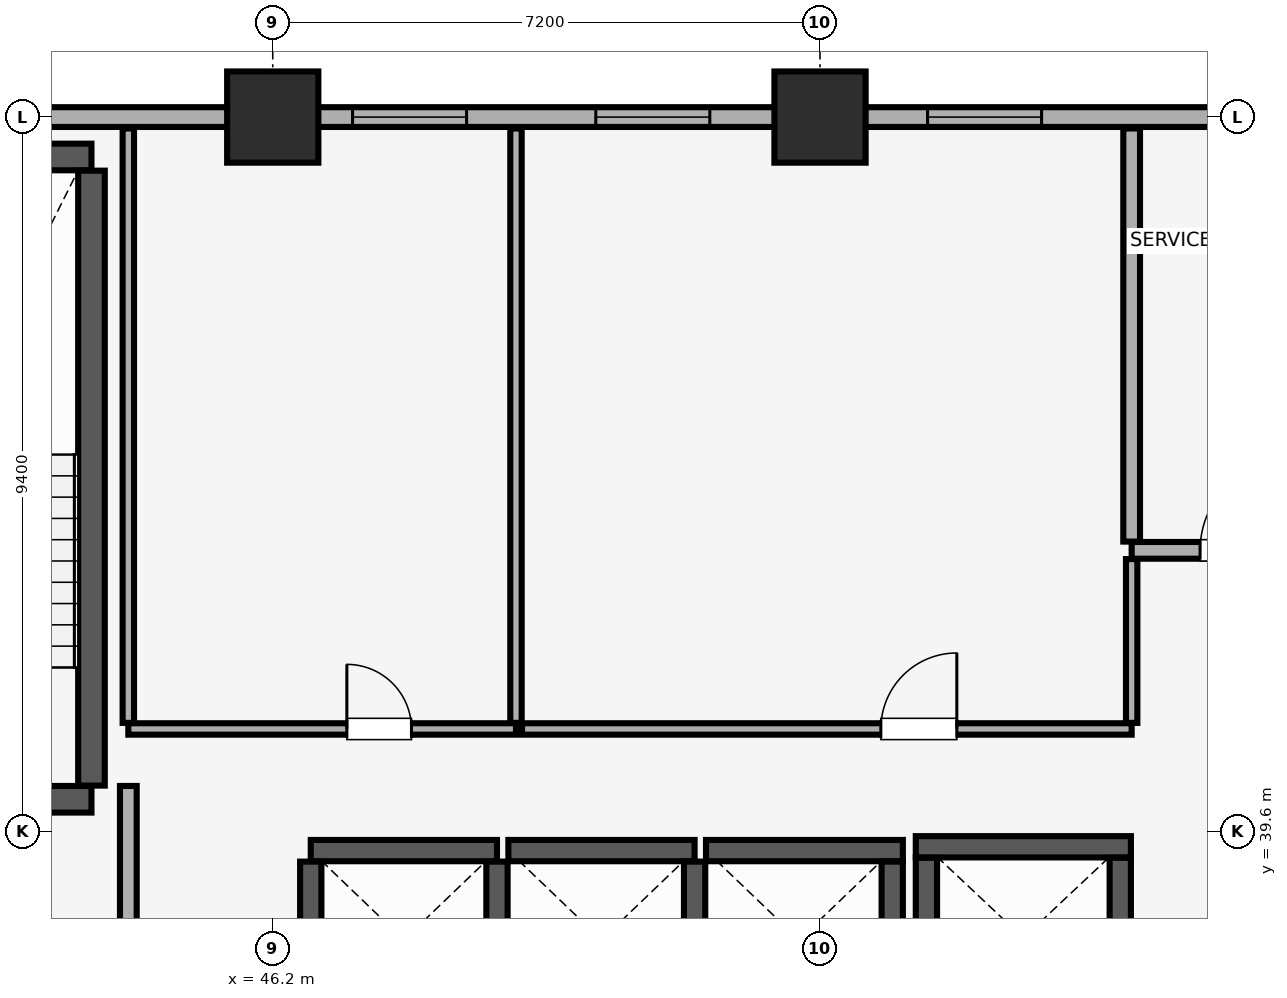
"""IFC4 building model, lengths in metres.
Left out: names, types, materials, properties, quantities, classifications, styles, units other than length and angle.
Written with IfcOpenShell. Run it as: python <this file> out.ifc"""

import sys

from ifc_helpers import new_model, si_unit, direction, frame, frame_2d, origin, origin_2d, place, context, subcontext, project, spatial, rectangle, extrude, element, fill, save


model = new_model("IFC4")
c1 = context("Model", 3, precision=1e-05, world=origin(), true_north=direction((0.0, 1.0)))
c2 = subcontext(c1, "Body", "Model", "MODEL_VIEW")
j1 = project(units=[si_unit("LENGTHUNIT", "METRE"), si_unit("PLANEANGLEUNIT", "RADIAN")], contexts=[c1])
p1 = place(None, origin())
s1 = spatial("IfcSite", under=j1, at=p1, CompositionType="ELEMENT")
p2 = place(p1, origin())
s2 = spatial("IfcBuilding", under=s1, at=p2, CompositionType="ELEMENT")
p3 = place(p2, frame((0.0, 0.0, 126.8)))
s3 = spatial("IfcBuildingStorey", under=s2, at=p3, CompositionType="ELEMENT", Elevation=126.8)
for number, where, z_axis, x_axis in (
    (1, (46.2, 49.0, 0.0), (0.0, 0.0, 1.0), (1.0, 0.0, 0.0)),
    (2, (53.4, 49.0, 0.0), (0.0, 0.0, 1.0), (1.0, 0.0, 0.0)),
):
    element("IfcColumn", number, at=place(p3, frame(where, z_axis=z_axis, x_axis=x_axis)), inside=s3, PredefinedType="COLUMN", context=c2, shape_type="SweptSolid", body=[
        extrude(rectangle(XDim=1.2, YDim=1.2, at=origin_2d()), origin(), (0.0, 0.0, 1.0), 3.51),
    ])
p4 = place(p3, frame((79.8, 49.0, 0.0), z_axis=(0.0, 0.0, 1.0), x_axis=(-1.0, 0.0, 0.0)))
e3 = element("IfcWall", 3, at=p4, inside=s3, PredefinedType="SOLIDWALL", context=c2, shape_type="SweptSolid", body=[
    extrude(rectangle(XDim=75.6, YDim=0.26, at=frame_2d((37.8, 0.0))), origin(), (0.0, 0.0, 1.0), 2.56),
])
p5 = place(p4, frame((72.565, 0.0, 0.85)))
e4 = element("IfcOpeningElement", 4, at=p5, cuts=e3, PredefinedType="OPENING", context=c2, shape_type="SweptSolid", body=[
    extrude(rectangle(XDim=1.5, YDim=1.4, at=frame_2d((0.75, 0.7))), frame((0.0, 0.14, 0.0), z_axis=(0.0, -1.0, 0.0), x_axis=(1.0, 0.0, 0.0)), (0.0, 0.0, 1.0), 0.28),
])
p6 = place(p4, frame((67.45, 0.0, 0.85)))
e5 = element("IfcOpeningElement", 5, at=p6, cuts=e3, PredefinedType="OPENING", context=c2, shape_type="SweptSolid", body=[
    extrude(rectangle(XDim=1.5, YDim=1.4, at=frame_2d((0.75, 0.7))), frame((0.0, 0.14, 0.0), z_axis=(0.0, -1.0, 0.0), x_axis=(1.0, 0.0, 0.0)), (0.0, 0.0, 1.0), 0.28),
])
p7 = place(p4, frame((7.6, 0.0, 0.85)))
e6 = element("IfcOpeningElement", 6, at=p7, cuts=e3, PredefinedType="OPENING", context=c2, shape_type="SweptSolid", body=[
    extrude(rectangle(XDim=1.5, YDim=1.4, at=frame_2d((0.75, 0.7))), frame((0.0, 0.14, 0.0), z_axis=(0.0, -1.0, 0.0), x_axis=(1.0, 0.0, 0.0)), (0.0, 0.0, 1.0), 0.28),
])
p8 = place(p4, frame((1.535, 0.0, 0.85)))
e7 = element("IfcOpeningElement", 7, at=p8, cuts=e3, PredefinedType="OPENING", context=c2, shape_type="SweptSolid", body=[
    extrude(rectangle(XDim=1.5, YDim=1.4, at=frame_2d((0.75, 0.7))), frame((0.0, 0.14, 0.0), z_axis=(0.0, -1.0, 0.0), x_axis=(1.0, 0.0, 0.0)), (0.0, 0.0, 1.0), 0.28),
])
p9 = place(p4, frame((52.265, 0.0, 0.9)))
e8 = element("IfcOpeningElement", 8, at=p9, cuts=e3, PredefinedType="OPENING", context=c2, shape_type="SweptSolid", body=[
    extrude(rectangle(XDim=1.5, YDim=1.4, at=frame_2d((0.75, 0.7))), frame((0.0, 0.14, 0.0), z_axis=(0.0, -1.0, 0.0), x_axis=(1.0, 0.0, 0.0)), (0.0, 0.0, 1.0), 0.28),
])
p10 = place(p4, frame((45.5, 0.0, 0.9)))
e9 = element("IfcOpeningElement", 9, at=p10, cuts=e3, PredefinedType="OPENING", context=c2, shape_type="SweptSolid", body=[
    extrude(rectangle(XDim=1.5, YDim=1.4, at=frame_2d((0.75, 0.7))), frame((0.0, 0.14, 0.0), z_axis=(0.0, -1.0, 0.0), x_axis=(1.0, 0.0, 0.0)), (0.0, 0.0, 1.0), 0.28),
])
p11 = place(p4, frame((31.05, 0.0, 0.9)))
e10 = element("IfcOpeningElement", 10, at=p11, cuts=e3, PredefinedType="OPENING", context=c2, shape_type="SweptSolid", body=[
    extrude(rectangle(XDim=1.5, YDim=1.4, at=frame_2d((0.75, 0.7))), frame((0.0, 0.14, 0.0), z_axis=(0.0, -1.0, 0.0), x_axis=(1.0, 0.0, 0.0)), (0.0, 0.0, 1.0), 0.28),
])
p12 = place(p4, frame((27.85, 0.0, 0.9)))
e11 = element("IfcOpeningElement", 11, at=p12, cuts=e3, PredefinedType="OPENING", context=c2, shape_type="SweptSolid", body=[
    extrude(rectangle(XDim=1.5, YDim=1.4, at=frame_2d((0.75, 0.7))), frame((0.0, 0.14, 0.0), z_axis=(0.0, -1.0, 0.0), x_axis=(1.0, 0.0, 0.0)), (0.0, 0.0, 1.0), 0.28),
])
p13 = place(p4, frame((23.485, 0.0, 0.9)))
e12 = element("IfcOpeningElement", 12, at=p13, cuts=e3, PredefinedType="OPENING", context=c2, shape_type="SweptSolid", body=[
    extrude(rectangle(XDim=1.5, YDim=1.4, at=frame_2d((0.75, 0.7))), frame((0.0, 0.14, 0.0), z_axis=(0.0, -1.0, 0.0), x_axis=(1.0, 0.0, 0.0)), (0.0, 0.0, 1.0), 0.28),
])
p14 = place(p3, frame((40.185, 40.025, 0.0), z_axis=(0.0, 0.0, 1.0), x_axis=(1.0, 0.0, 0.0)))
e13 = element("IfcWall", 13, at=p14, inside=s3, PredefinedType="SHEAR", context=c2, shape_type="SweptSolid", body=[
    extrude(rectangle(XDim=3.63, YDim=0.35, at=frame_2d((1.815, 0.0))), origin(), (0.0, 0.0, 1.0), 3.51),
])
p15 = place(p14, frame((1.24, 0.0, 0.0)))
e14 = element("IfcOpeningElement", 14, at=p15, cuts=e13, PredefinedType="OPENING", context=c2, shape_type="SweptSolid", body=[
    extrude(rectangle(XDim=1.15, YDim=2.15, at=frame_2d((0.575, 1.075))), frame((0.0, 0.185, 0.0), z_axis=(0.0, -1.0, 0.0), x_axis=(1.0, 0.0, 0.0)), (0.0, 0.0, 1.0), 0.37),
])
p16 = place(p3, frame((40.185, 48.475, 0.0), z_axis=(0.0, 0.0, 1.0), x_axis=(1.0, 0.0, 0.0)))
e15 = element("IfcWall", 15, at=p16, inside=s3, PredefinedType="SHEAR", context=c2, shape_type="SweptSolid", body=[
    extrude(rectangle(XDim=3.63, YDim=0.35, at=frame_2d((1.815, 0.0))), origin(), (0.0, 0.0, 1.0), 3.51),
])
p17 = place(p3, frame((43.815, 40.205, 0.0), z_axis=(0.0, 0.0, 1.0), x_axis=(0.0, 1.0, 0.0)))
e16 = element("IfcWall", 16, at=p17, inside=s3, PredefinedType="SHEAR", context=c2, shape_type="SweptSolid", body=[
    extrude(rectangle(XDim=8.09, YDim=0.35, at=frame_2d((4.045, 0.0))), origin(), (0.0, 0.0, 1.0), 3.51),
])
p18 = place(p3, frame((46.7, 39.35, 0.0), z_axis=(0.0, 0.0, 1.0), x_axis=(1.0, 0.0, 0.0)))
e17 = element("IfcWall", 17, at=p18, inside=s3, PredefinedType="SHEAR", context=c2, shape_type="SweptSolid", body=[
    extrude(rectangle(XDim=2.45, YDim=0.28, at=frame_2d((1.225, 0.0))), origin(), (0.0, 0.0, 1.0), 3.51),
])
for number, where, z_axis, x_axis in (
    (18, (46.7, 37.145, 0.0), (0.0, 0.0, 1.0), (0.0, 1.0, 0.0)),
    (19, (49.15, 37.145, 0.0), (0.0, 0.0, 1.0), (0.0, 1.0, 0.0)),
):
    element("IfcWall", number, at=place(p3, frame(where, z_axis=z_axis, x_axis=x_axis)), inside=s3, PredefinedType="SHEAR", context=c2, shape_type="SweptSolid", body=[
        extrude(rectangle(XDim=2.06, YDim=0.28, at=frame_2d((1.03, 0.0))), origin(), (0.0, 0.0, 1.0), 3.51),
    ])
p19 = place(p3, frame((49.3, 39.35, 0.0), z_axis=(0.0, 0.0, 1.0), x_axis=(1.0, 0.0, 0.0)))
e20 = element("IfcWall", 20, at=p19, inside=s3, PredefinedType="SHEAR", context=c2, shape_type="SweptSolid", body=[
    extrude(rectangle(XDim=2.45, YDim=0.28, at=frame_2d((1.225, 0.0))), origin(), (0.0, 0.0, 1.0), 3.51),
])
p20 = place(p3, frame((51.75, 37.145, 0.0), z_axis=(0.0, 0.0, 1.0), x_axis=(0.0, 1.0, 0.0)))
e21 = element("IfcWall", 21, at=p20, inside=s3, PredefinedType="SHEAR", context=c2, shape_type="SweptSolid", body=[
    extrude(rectangle(XDim=2.06, YDim=0.28, at=frame_2d((1.03, 0.0))), origin(), (0.0, 0.0, 1.0), 3.51),
])
p21 = place(p3, frame((51.9, 39.35, 0.0), z_axis=(0.0, 0.0, 1.0), x_axis=(1.0, 0.0, 0.0)))
e22 = element("IfcWall", 22, at=p21, inside=s3, PredefinedType="SHEAR", context=c2, shape_type="SweptSolid", body=[
    extrude(rectangle(XDim=2.59, YDim=0.28, at=frame_2d((1.295, 0.0))), origin(), (0.0, 0.0, 1.0), 3.51),
])
p22 = place(p3, frame((54.35, 37.145, 0.0), z_axis=(0.0, 0.0, 1.0), x_axis=(0.0, 1.0, 0.0)))
e23 = element("IfcWall", 23, at=p22, inside=s3, PredefinedType="SHEAR", context=c2, shape_type="SweptSolid", body=[
    extrude(rectangle(XDim=2.06, YDim=0.28, at=frame_2d((1.03, 0.0))), origin(), (0.0, 0.0, 1.0), 3.51),
])
p23 = place(p3, frame((54.66, 39.4, 0.0), z_axis=(0.0, 0.0, 1.0), x_axis=(1.0, 0.0, 0.0)))
e24 = element("IfcWall", 24, at=p23, inside=s3, PredefinedType="SHEAR", context=c2, shape_type="SweptSolid", body=[
    extrude(rectangle(XDim=2.83, YDim=0.28, at=frame_2d((1.415, 0.0))), origin(), (0.0, 0.0, 1.0), 3.51),
])
for number, where, z_axis, x_axis in (
    (25, (54.8, 37.145, 0.0), (0.0, 0.0, 1.0), (0.0, 1.0, 0.0)),
    (26, (57.35, 37.145, 0.0), (0.0, 0.0, 1.0), (0.0, 1.0, 0.0)),
):
    element("IfcWall", number, at=place(p3, frame(where, z_axis=z_axis, x_axis=x_axis)), inside=s3, PredefinedType="SHEAR", context=c2, shape_type="SweptSolid", body=[
        extrude(rectangle(XDim=2.11, YDim=0.28, at=frame_2d((1.055, 0.0))), origin(), (0.0, 0.0, 1.0), 3.51),
    ])
p24 = place(p3, frame((44.3, 34.415, 0.0), z_axis=(0.0, 0.0, 1.0), x_axis=(0.0, 1.0, 0.0)))
e27 = element("IfcWall", 27, at=p24, inside=s3, PredefinedType="PARTITIONING", context=c2, shape_type="SweptSolid", body=[
    extrude(rectangle(XDim=5.785, YDim=0.22, at=frame_2d((2.893, 0.0))), origin(), (0.0, 0.0, 1.0), 3.51),
])
p25 = place(p3, frame((57.5, 43.3, 0.0), z_axis=(0.0, 0.0, 1.0), x_axis=(1.0, 0.0, 0.0)))
e28 = element("IfcWall", 28, at=p25, inside=s3, PredefinedType="PARTITIONING", context=c2, shape_type="SweptSolid", body=[
    extrude(rectangle(XDim=3.04, YDim=0.22, at=frame_2d((1.52, 0.0))), origin(), (0.0, 0.0, 1.0), 3.51),
])
p26 = place(p25, frame((0.9, 0.0, 0.0)))
e29 = element("IfcOpeningElement", 29, at=p26, cuts=e28, PredefinedType="OPENING", context=c2, shape_type="SweptSolid", body=[
    extrude(rectangle(XDim=1.2, YDim=2.15, at=frame_2d((0.6, 1.075))), frame((0.0, 0.12, 0.0), z_axis=(0.0, -1.0, 0.0), x_axis=(1.0, 0.0, 0.0)), (0.0, 0.0, 1.0), 0.24),
])
p27 = place(p3, frame((57.5, 43.415, 0.0), z_axis=(0.0, 0.0, 1.0), x_axis=(0.0, 1.0, 0.0)))
e30 = element("IfcWall", 30, at=p27, inside=s3, PredefinedType="PARTITIONING", context=c2, shape_type="SweptSolid", body=[
    extrude(rectangle(XDim=5.435, YDim=0.22, at=frame_2d((2.718, 0.0))), origin(), (0.0, 0.0, 1.0), 3.51),
])
p28 = place(p3, frame((44.3, 40.95, 0.0), z_axis=(0.0, 0.0, 1.0), x_axis=(1.0, 0.0, 0.0)))
e31 = element("IfcWall", 31, at=p28, inside=s3, PredefinedType="PARTITIONING", context=c2, shape_type="SweptSolid", body=[
    extrude(rectangle(XDim=5.1, YDim=0.15, at=frame_2d((2.55, 0.0))), origin(), (0.0, 0.0, 1.0), 3.51),
])
p29 = place(p28, frame((2.875, 0.0, 0.0)))
e32 = element("IfcOpeningElement", 32, at=p29, cuts=e31, PredefinedType="OPENING", context=c2, shape_type="SweptSolid", body=[
    extrude(rectangle(XDim=0.85, YDim=2.1, at=frame_2d((0.425, 1.05))), frame((0.0, 0.085, 0.0), z_axis=(0.0, -1.0, 0.0), x_axis=(1.0, 0.0, 0.0)), (0.0, 0.0, 1.0), 0.17),
])
for number, where, z_axis, x_axis in (
    (33, (44.3, 41.03, 0.0), (0.0, 0.0, 1.0), (0.0, 1.0, 0.0)),
    (34, (49.4, 41.03, 0.0), (0.0, 0.0, 1.0), (0.0, 1.0, 0.0)),
):
    element("IfcWall", number, at=place(p3, frame(where, z_axis=z_axis, x_axis=x_axis)), inside=s3, PredefinedType="PARTITIONING", context=c2, shape_type="SweptSolid", body=[
        extrude(rectangle(XDim=7.82, YDim=0.15, at=frame_2d((3.91, 0.0))), origin(), (0.0, 0.0, 1.0), 3.51),
    ])
p30 = place(p3, frame((49.48, 40.95, 0.0), z_axis=(0.0, 0.0, 1.0), x_axis=(1.0, 0.0, 0.0)))
e35 = element("IfcWall", 35, at=p30, inside=s3, PredefinedType="PARTITIONING", context=c2, shape_type="SweptSolid", body=[
    extrude(rectangle(XDim=8.02, YDim=0.15, at=frame_2d((4.01, 0.0))), origin(), (0.0, 0.0, 1.0), 3.51),
])
p31 = place(p30, frame((4.72, 0.0, 0.0)))
e36 = element("IfcOpeningElement", 36, at=p31, cuts=e35, PredefinedType="OPENING", context=c2, shape_type="SweptSolid", body=[
    extrude(rectangle(XDim=1.0, YDim=2.15, at=frame_2d((0.5, 1.075))), frame((0.0, 0.085, 0.0), z_axis=(0.0, -1.0, 0.0), x_axis=(1.0, 0.0, 0.0)), (0.0, 0.0, 1.0), 0.17),
])
p32 = place(p3, frame((57.5, 41.03, 0.0), z_axis=(0.0, 0.0, 1.0), x_axis=(0.0, 1.0, 0.0)))
e37 = element("IfcWall", 37, at=p32, inside=s3, PredefinedType="PARTITIONING", context=c2, shape_type="SweptSolid", body=[
    extrude(rectangle(XDim=2.155, YDim=0.15, at=frame_2d((1.078, 0.0))), origin(), (0.0, 0.0, 1.0), 3.51),
])
p33 = place(p11, origin())
e38 = element("IfcWindow", 38, at=p33, inside=s3, PartitioningType="SINGLE_PANEL", PredefinedType="WINDOW", context=c2, shape_type="SweptSolid", body=[
    extrude(rectangle(XDim=1.5, YDim=1.4, at=frame_2d((0.75, 0.7))), frame((0.0, 0.03, 0.0), z_axis=(0.0, -1.0, 0.0), x_axis=(1.0, 0.0, 0.0)), (0.0, 0.0, 1.0), 0.06),
])
fill(e10, e38)
p34 = place(p12, origin())
e39 = element("IfcWindow", 39, at=p34, inside=s3, PartitioningType="SINGLE_PANEL", PredefinedType="WINDOW", context=c2, shape_type="SweptSolid", body=[
    extrude(rectangle(XDim=1.5, YDim=1.4, at=frame_2d((0.75, 0.7))), frame((0.0, 0.03, 0.0), z_axis=(0.0, -1.0, 0.0), x_axis=(1.0, 0.0, 0.0)), (0.0, 0.0, 1.0), 0.06),
])
fill(e11, e39)
p35 = place(p13, origin())
e40 = element("IfcWindow", 40, at=p35, inside=s3, PartitioningType="SINGLE_PANEL", PredefinedType="WINDOW", context=c2, shape_type="SweptSolid", body=[
    extrude(rectangle(XDim=1.5, YDim=1.4, at=frame_2d((0.75, 0.7))), frame((0.0, 0.03, 0.0), z_axis=(0.0, -1.0, 0.0), x_axis=(1.0, 0.0, 0.0)), (0.0, 0.0, 1.0), 0.06),
])
fill(e12, e40)
p36 = place(p26, origin())
e41 = element("IfcDoor", 41, at=p36, inside=s3, OperationType="SINGLE_SWING_RIGHT", PredefinedType="DOOR", context=c2, shape_type="SweptSolid", body=[
    extrude(rectangle(XDim=1.2, YDim=2.15, at=frame_2d((0.6, 1.075))), frame((0.0, 0.025, 0.0), z_axis=(0.0, -1.0, 0.0), x_axis=(1.0, 0.0, 0.0)), (0.0, 0.0, 1.0), 0.05),
])
fill(e29, e41)
p37 = place(p29, origin())
e42 = element("IfcDoor", 42, at=p37, inside=s3, OperationType="SINGLE_SWING_LEFT", PredefinedType="DOOR", context=c2, shape_type="SweptSolid", body=[
    extrude(rectangle(XDim=0.85, YDim=2.1, at=frame_2d((0.425, 1.05))), frame((0.0, 0.025, 0.0), z_axis=(0.0, -1.0, 0.0), x_axis=(1.0, 0.0, 0.0)), (0.0, 0.0, 1.0), 0.05),
])
fill(e32, e42)
p38 = place(p31, origin())
e43 = element("IfcDoor", 43, at=p38, inside=s3, OperationType="SINGLE_SWING_RIGHT", PredefinedType="DOOR", context=c2, shape_type="SweptSolid", body=[
    extrude(rectangle(XDim=1.0, YDim=2.15, at=frame_2d((0.5, 1.075))), frame((0.0, 0.025, 0.0), z_axis=(0.0, -1.0, 0.0), x_axis=(1.0, 0.0, 0.0)), (0.0, 0.0, 1.0), 0.05),
])
fill(e36, e43)
save(model, sys.argv[1])
